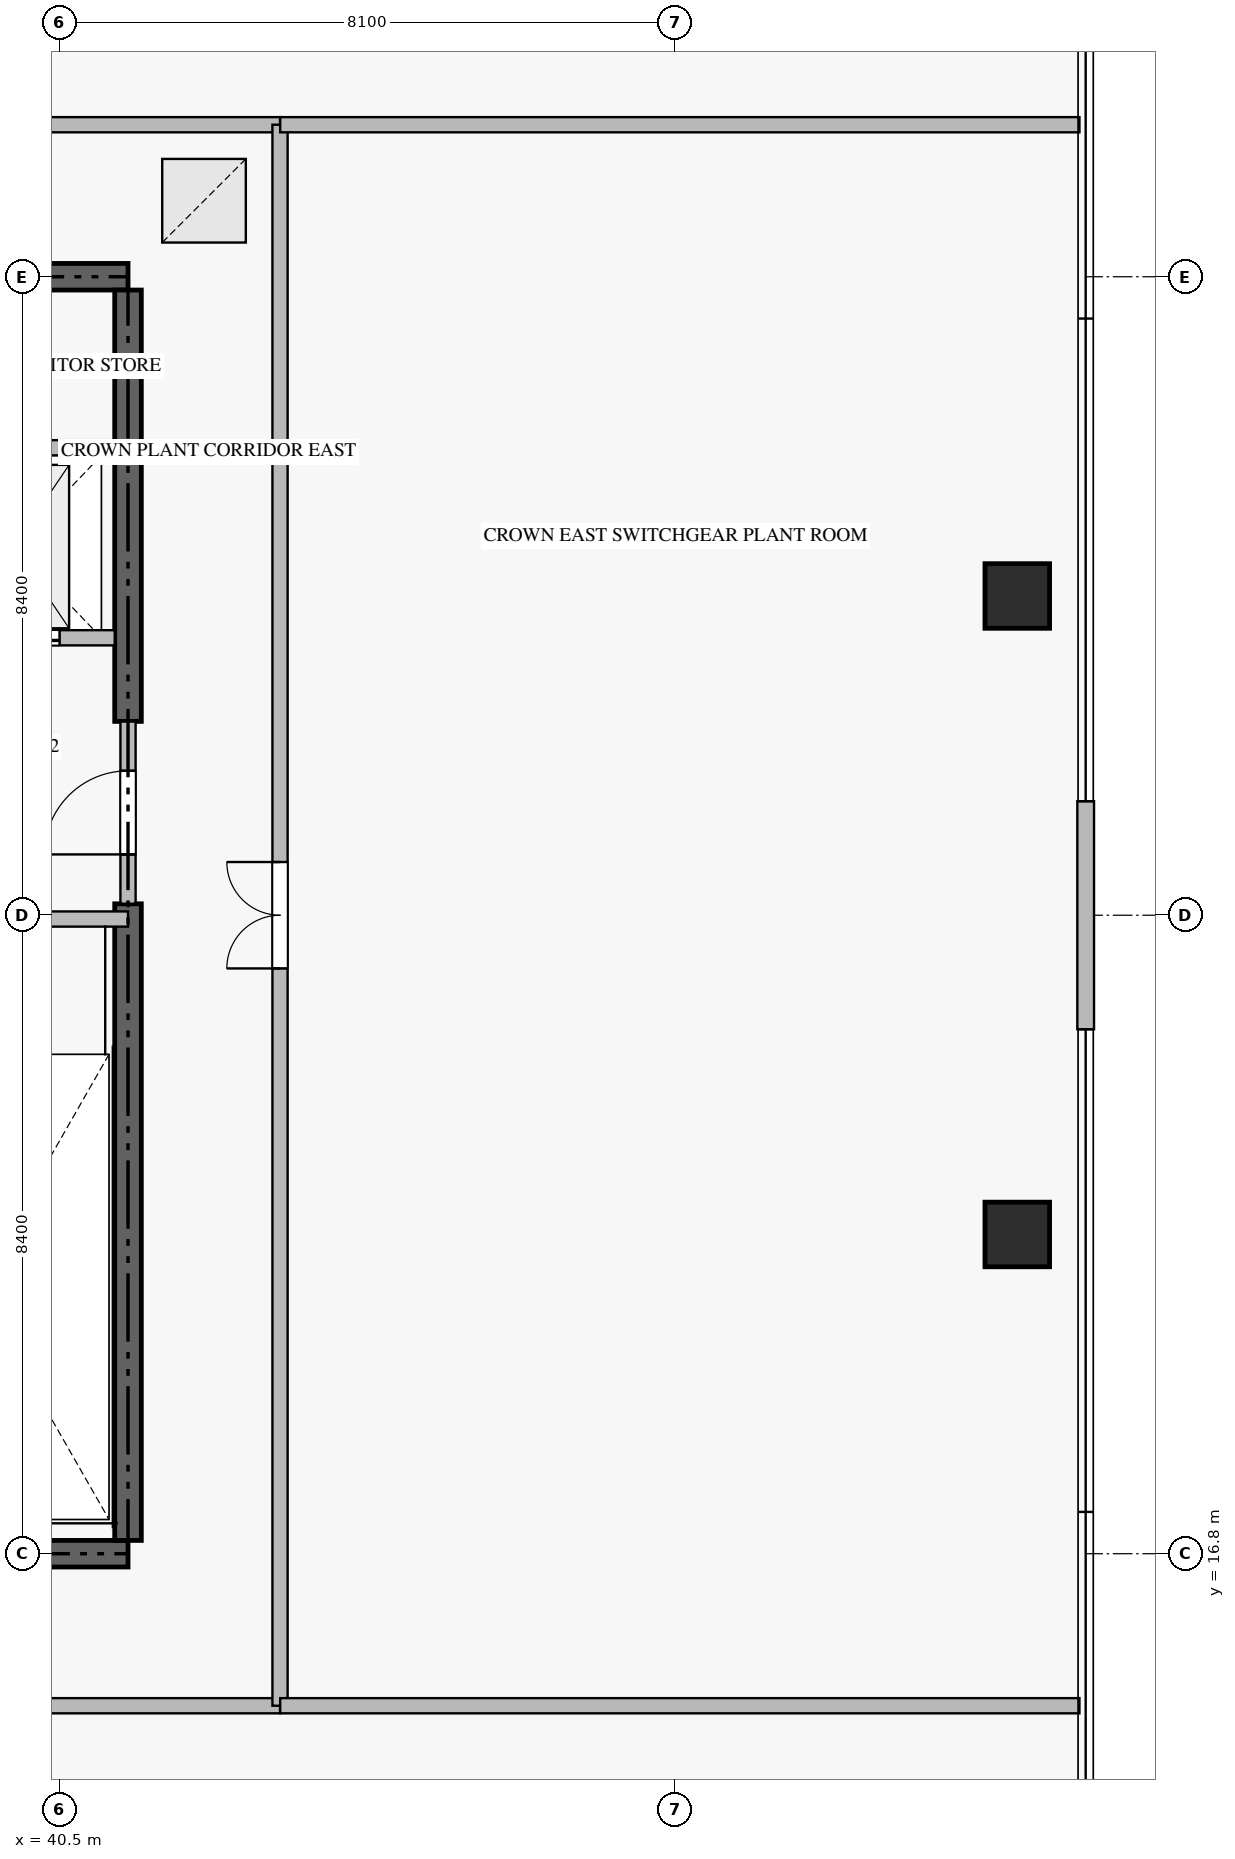
"""IFC4 building model, lengths in metres.
Left out: names, types, materials, properties, quantities, classifications, styles, units other than length and angle.
Written with IfcOpenShell. Run it as: python <this file> out.ifc"""

import sys

from ifc_helpers import new_model, si_unit, direction, frame, frame_2d, origin, origin_2d, place, context, subcontext, project, spatial, rectangle, extrude, source, transform, mapped, element, fill, save


model = new_model("IFC4")
c1 = context("Model", 3, precision=1e-05, world=origin(), true_north=direction((0.0, 1.0)))
c2 = subcontext(c1, "Body", "Model", "MODEL_VIEW")
j1 = project(units=[si_unit("LENGTHUNIT", "METRE"), si_unit("PLANEANGLEUNIT", "RADIAN")], contexts=[c1])
p1 = place(None, origin())
s1 = spatial("IfcSite", under=j1, at=p1, CompositionType="ELEMENT")
p2 = place(p1, origin())
s2 = spatial("IfcBuilding", under=s1, at=p2, CompositionType="ELEMENT")
p3 = place(p2, frame((0.0, 0.0, 365.75)))
s3 = spatial("IfcBuildingStorey", under=s2, at=p3, CompositionType="ELEMENT", Elevation=365.75)
for number, where, z_axis, x_axis in (
    (1, (23.4, 16.8, -0.36), (0.0, 0.0, 1.0), (1.0, 0.0, 0.0)),
    (2, (41.4, 33.6, -0.36), (0.0, 0.0, 1.0), (-1.0, 0.0, 0.0)),
):
    element("IfcWall", number, at=place(p3, frame(where, z_axis=z_axis, x_axis=x_axis)), inside=s3, PredefinedType="SHEAR", context=c2, shape_type="SweptSolid", body=[
        extrude(rectangle(XDim=18.0, YDim=0.35, at=frame_2d((9.0, 0.0))), origin(), (0.0, 0.0, 1.0), 5.258),
    ])
p4 = place(p3, frame((41.4, 16.975, -0.36), z_axis=(0.0, 0.0, 1.0), x_axis=(0.0, 1.0, 0.0)))
e3 = element("IfcWall", 3, at=p4, inside=s3, PredefinedType="SHEAR", context=c2, shape_type="SweptSolid", body=[
    extrude(rectangle(XDim=8.375, YDim=0.35, at=frame_2d((4.188, 0.0))), origin(), (0.0, 0.0, 1.0), 5.258),
])
p5 = place(p3, frame((41.4, 27.75, -0.36), z_axis=(0.0, 0.0, 1.0), x_axis=(0.0, 1.0, 0.0)))
e4 = element("IfcWall", 4, at=p5, inside=s3, PredefinedType="SHEAR", context=c2, shape_type="SweptSolid", body=[
    extrude(rectangle(XDim=5.675, YDim=0.35, at=frame_2d((2.837, 0.0))), origin(), (0.0, 0.0, 1.0), 5.258),
])
m1 = source(origin(), c2, "Body", "SweptSolid", [
    extrude(rectangle(XDim=0.85, YDim=0.85, at=origin_2d()), origin(), (0.0, 0.0, 1.0), 5.26),
])
for number, where, z_axis, x_axis in (
    (5, (53.1, 21.0, -0.36), (0.0, 0.0, 1.0), (1.0, 0.0, 0.0)),
    (6, (53.1, 29.4, -0.36), (0.0, 0.0, 1.0), (1.0, 0.0, 0.0)),
):
    element("IfcColumn", number, at=place(p3, frame(where, z_axis=z_axis, x_axis=x_axis)), inside=s3, PredefinedType="COLUMN", context=c2, shape_type="MappedRepresentation", body=[
        mapped(m1, transform((0.0, 0.0, 0.0), scale=1.0)),
    ])
p6 = place(p3, frame((54.0, 23.7, 0.0), z_axis=(0.0, 0.0, 1.0), x_axis=(0.0, 1.0, 0.0)))
e7 = element("IfcWall", 7, at=p6, inside=s3, PredefinedType="ELEMENTEDWALL", context=c2, shape_type="SweptSolid", body=[
    extrude(rectangle(XDim=3.0, YDim=0.22, at=frame_2d((1.5, 0.0))), origin(), (0.0, 0.0, 1.0), 4.885),
])
p7 = place(p3, frame((36.95, 25.15, 0.0), z_axis=(0.0, 0.0, 1.0), x_axis=(1.0, 0.0, 0.0)))
e8 = element("IfcWall", 8, at=p7, inside=s3, PredefinedType="STANDARD", context=c2, shape_type="SweptSolid", body=[
    extrude(rectangle(XDim=4.45, YDim=0.2, at=frame_2d((2.225, 0.0))), origin(), (0.0, 0.0, 1.0), 4.9),
])
p8 = place(p7, frame((1.65, 0.0, 0.0)))
e9 = element("IfcOpeningElement", 9, at=p8, cuts=e8, PredefinedType="OPENING", context=c2, shape_type="SweptSolid", body=[
    extrude(rectangle(XDim=1.1, YDim=2.15, at=frame_2d((0.55, 1.075))), frame((0.0, 0.11, 0.0), z_axis=(0.0, -1.0, 0.0), x_axis=(1.0, 0.0, 0.0)), (0.0, 0.0, 1.0), 0.22),
])
p9 = place(p3, frame((38.75, 28.85, 0.0), z_axis=(0.0, 0.0, 1.0), x_axis=(1.0, 0.0, 0.0)))
e10 = element("IfcWall", 10, at=p9, inside=s3, PredefinedType="STANDARD", context=c2, shape_type="SweptSolid", body=[
    extrude(rectangle(XDim=2.475, YDim=0.2, at=frame_2d((1.238, 0.0))), origin(), (0.0, 0.0, 1.0), 4.9),
])
p10 = place(p9, frame((0.55, 0.0, 0.0)))
e11 = element("IfcOpeningElement", 11, at=p10, cuts=e10, PredefinedType="OPENING", context=c2, shape_type="SweptSolid", body=[
    extrude(rectangle(XDim=1.2, YDim=2.2, at=frame_2d((0.6, 1.1))), frame((0.0, 0.11, 0.0), z_axis=(0.0, -1.0, 0.0), x_axis=(1.0, 0.0, 0.0)), (0.0, 0.0, 1.0), 0.22),
])
p11 = place(p3, frame((38.75, 31.35, 0.0), z_axis=(0.0, 0.0, 1.0), x_axis=(1.0, 0.0, 0.0)))
e12 = element("IfcWall", 12, at=p11, inside=s3, PredefinedType="STANDARD", context=c2, shape_type="SweptSolid", body=[
    extrude(rectangle(XDim=2.475, YDim=0.2, at=frame_2d((1.238, 0.0))), origin(), (0.0, 0.0, 1.0), 4.9),
])
p12 = place(p3, frame((41.4, 25.352, 0.0), z_axis=(0.0, 0.0, 1.0), x_axis=(0.0, 1.0, 0.0)))
e13 = element("IfcWall", 13, at=p12, inside=s3, PredefinedType="STANDARD", context=c2, shape_type="SweptSolid", body=[
    extrude(rectangle(XDim=2.396, YDim=0.2, at=frame_2d((1.198, 0.0))), origin(), (0.0, 0.0, 1.0), 4.9),
])
p13 = place(p12, frame((0.648, 0.0, 0.0)))
e14 = element("IfcOpeningElement", 14, at=p13, cuts=e13, PredefinedType="OPENING", context=c2, shape_type="SweptSolid", body=[
    extrude(rectangle(XDim=1.1, YDim=2.15, at=frame_2d((0.55, 1.075))), frame((0.0, 0.11, 0.0), z_axis=(0.0, -1.0, 0.0), x_axis=(1.0, 0.0, 0.0)), (0.0, 0.0, 1.0), 0.22),
])
p14 = place(p3, frame((21.4, 14.8, 0.0), z_axis=(0.0, 0.0, 1.0), x_axis=(1.0, 0.0, 0.0)))
e15 = element("IfcWall", 15, at=p14, inside=s3, PredefinedType="STANDARD", context=c2, shape_type="SweptSolid", body=[
    extrude(rectangle(XDim=22.0, YDim=0.2, at=frame_2d((11.0, 0.0))), origin(), (0.0, 0.0, 1.0), 4.9),
])
p15 = place(p14, frame((5.15, 0.0, 0.0)))
e16 = element("IfcOpeningElement", 16, at=p15, cuts=e15, PredefinedType="OPENING", context=c2, shape_type="SweptSolid", body=[
    extrude(rectangle(XDim=1.4, YDim=2.2, at=frame_2d((0.7, 1.1))), frame((0.0, 0.11, 0.0), z_axis=(0.0, -1.0, 0.0), x_axis=(1.0, 0.0, 0.0)), (0.0, 0.0, 1.0), 0.22),
])
p16 = place(p14, frame((15.45, 0.0, 0.0)))
e17 = element("IfcOpeningElement", 17, at=p16, cuts=e15, PredefinedType="OPENING", context=c2, shape_type="SweptSolid", body=[
    extrude(rectangle(XDim=1.4, YDim=2.2, at=frame_2d((0.7, 1.1))), frame((0.0, 0.11, 0.0), z_axis=(0.0, -1.0, 0.0), x_axis=(1.0, 0.0, 0.0)), (0.0, 0.0, 1.0), 0.22),
])
p17 = place(p3, frame((21.4, 35.6, 0.0), z_axis=(0.0, 0.0, 1.0), x_axis=(1.0, 0.0, 0.0)))
e18 = element("IfcWall", 18, at=p17, inside=s3, PredefinedType="STANDARD", context=c2, shape_type="SweptSolid", body=[
    extrude(rectangle(XDim=22.0, YDim=0.2, at=frame_2d((11.0, 0.0))), origin(), (0.0, 0.0, 1.0), 4.9),
])
p18 = place(p17, frame((5.15, 0.0, 0.0)))
e19 = element("IfcOpeningElement", 19, at=p18, cuts=e18, PredefinedType="OPENING", context=c2, shape_type="SweptSolid", body=[
    extrude(rectangle(XDim=1.4, YDim=2.2, at=frame_2d((0.7, 1.1))), frame((0.0, 0.11, 0.0), z_axis=(0.0, -1.0, 0.0), x_axis=(1.0, 0.0, 0.0)), (0.0, 0.0, 1.0), 0.22),
])
p19 = place(p17, frame((15.45, 0.0, 0.0)))
e20 = element("IfcOpeningElement", 20, at=p19, cuts=e18, PredefinedType="OPENING", context=c2, shape_type="SweptSolid", body=[
    extrude(rectangle(XDim=1.4, YDim=2.2, at=frame_2d((0.7, 1.1))), frame((0.0, 0.11, 0.0), z_axis=(0.0, -1.0, 0.0), x_axis=(1.0, 0.0, 0.0)), (0.0, 0.0, 1.0), 0.22),
])
p20 = place(p3, frame((43.4, 14.8, 0.0), z_axis=(0.0, 0.0, 1.0), x_axis=(0.0, 1.0, 0.0)))
e21 = element("IfcWall", 21, at=p20, inside=s3, PredefinedType="STANDARD", context=c2, shape_type="SweptSolid", body=[
    extrude(rectangle(XDim=20.8, YDim=0.2, at=frame_2d((10.4, 0.0))), origin(), (0.0, 0.0, 1.0), 4.9),
])
p21 = place(p20, frame((9.7, 0.0, 0.0)))
e22 = element("IfcOpeningElement", 22, at=p21, cuts=e21, PredefinedType="OPENING", context=c2, shape_type="SweptSolid", body=[
    extrude(rectangle(XDim=1.4, YDim=2.2, at=frame_2d((0.7, 1.1))), frame((0.0, 0.11, 0.0), z_axis=(0.0, -1.0, 0.0), x_axis=(1.0, 0.0, 0.0)), (0.0, 0.0, 1.0), 0.22),
])
for number, where, z_axis, x_axis in (
    (23, (43.402, 14.8, 0.0), (0.0, 0.0, 1.0), (1.0, 0.0, 0.0)),
    (24, (43.402, 35.6, 0.0), (0.0, 0.0, 1.0), (1.0, 0.0, 0.0)),
):
    element("IfcWall", number, at=place(p3, frame(where, z_axis=z_axis, x_axis=x_axis)), inside=s3, PredefinedType="STANDARD", context=c2, shape_type="SweptSolid", body=[
        extrude(rectangle(XDim=10.516, YDim=0.2, at=frame_2d((5.258, 0.0))), origin(), (0.0, 0.0, 1.0), 4.9),
    ])
p22 = place(p2, frame((0.0, 0.0, 370.95)))
p23 = place(p22, frame((0.0, 0.0, -0.3)))
p24 = place(p23, frame((42.4, 34.6, 0.0)))
p25 = place(p24, frame((0.0, 0.0, 0.26)))
e25 = element("IfcDoor", 25, at=p25, inside=s3, OperationType="SINGLE_SWING_LEFT", PredefinedType="TRAPDOOR", context=c2, shape_type="SweptSolid", body=[
    extrude(rectangle(XDim=1.1, YDim=1.1, at=origin_2d()), origin(), (0.0, 0.0, 1.0), 0.04),
])
m2 = source(origin(), c2, "Body", "SweptSolid", [
    extrude(rectangle(XDim=1.2, YDim=2.2, at=frame_2d((0.6, 1.1))), frame((0.0, 0.025, 0.0), z_axis=(0.0, -1.0, 0.0), x_axis=(1.0, 0.0, 0.0)), (0.0, 0.0, 1.0), 0.05),
])
p26 = place(p10, origin())
e26 = element("IfcDoor", 26, at=p26, inside=s3, OperationType="DOUBLE_DOOR_SLIDING", PredefinedType="DOOR", context=c2, shape_type="MappedRepresentation", body=[
    mapped(m2, transform((0.0, 0.0, 0.0), scale=1.0)),
])
fill(e11, e26)
m3 = source(origin(), c2, "Body", "SweptSolid", [
    extrude(rectangle(XDim=1.1, YDim=2.15, at=frame_2d((0.55, 1.075))), frame((0.0, 0.025, 0.0), z_axis=(0.0, -1.0, 0.0), x_axis=(1.0, 0.0, 0.0)), (0.0, 0.0, 1.0), 0.05),
])
p27 = place(p13, origin())
e27 = element("IfcDoor", 27, at=p27, inside=s3, OperationType="SINGLE_SWING_LEFT", PredefinedType="DOOR", context=c2, shape_type="MappedRepresentation", body=[
    mapped(m3, transform((0.0, 0.0, 0.0), scale=1.0)),
])
fill(e14, e27)
m4 = source(origin(), c2, "Body", "SweptSolid", [
    extrude(rectangle(XDim=1.4, YDim=2.2, at=frame_2d((0.7, 1.1))), frame((0.0, 0.025, 0.0), z_axis=(0.0, -1.0, 0.0), x_axis=(1.0, 0.0, 0.0)), (0.0, 0.0, 1.0), 0.05),
])
p28 = place(p21, origin())
e28 = element("IfcDoor", 28, at=p28, inside=s3, OperationType="DOUBLE_DOOR_SINGLE_SWING", PredefinedType="DOOR", context=c2, shape_type="MappedRepresentation", body=[
    mapped(m4, transform((0.0, 0.0, 0.0), scale=1.0)),
])
fill(e22, e28)
save(model, sys.argv[1])
